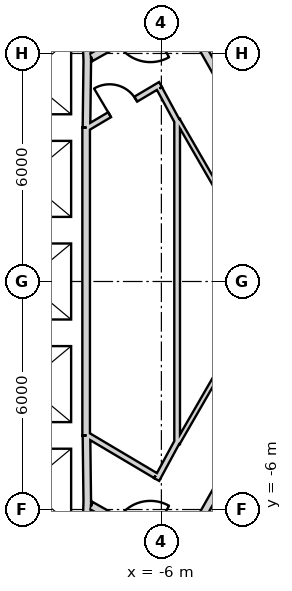
"""IFC4 building model, lengths in metres.
Left out: names, types, materials, properties, quantities, classifications, styles, units other than length and angle.
Written with IfcOpenShell. Run it as: python <this file> out.ifc"""

import sys

from ifc_helpers import new_model, si_unit, direction, frame, frame_2d, origin, place, context, subcontext, project, spatial, rectangle, extrude, element, fill, save


model = new_model("IFC4")
c1 = context("Model", 3, precision=1e-05, world=origin(), true_north=direction((0.0, 1.0)))
c2 = subcontext(c1, "Body", "Model", "MODEL_VIEW")
j1 = project(units=[si_unit("LENGTHUNIT", "METRE"), si_unit("PLANEANGLEUNIT", "RADIAN")], contexts=[c1])
p1 = place(None, origin())
s1 = spatial("IfcSite", under=j1, at=p1, CompositionType="ELEMENT")
p2 = place(p1, origin())
s2 = spatial("IfcBuilding", under=s1, at=p2, CompositionType="ELEMENT")
p3 = place(p2, origin())
s3 = spatial("IfcBuildingStorey", under=s2, at=p3, CompositionType="ELEMENT", Elevation=0.0)
p4 = place(p3, frame((19.475, 2.208, 0.0), z_axis=(0.0, 0.0, 1.0), x_axis=(-0.866028369851, 0.499994862586, 0.0)))
e1 = element("IfcWall", 1, at=p4, inside=s3, PredefinedType="SHEAR", context=c2, shape_type="SweptSolid", body=[
    extrude(rectangle(XDim=31.523, YDim=0.9, at=frame_2d((15.762, 0.0))), origin(), (0.0, 0.0, 1.0), 9.0),
])
p5 = place(p4, frame((7.062, 0.0, 0.0)))
e2 = element("IfcOpeningElement", 2, at=p5, cuts=e1, PredefinedType="OPENING", context=c2, shape_type="SweptSolid", body=[
    extrude(rectangle(XDim=1.2, YDim=2.4, at=frame_2d((0.6, 1.2))), frame((0.0, 0.46, 0.0), z_axis=(0.0, -1.0, 0.0), x_axis=(1.0, 0.0, 0.0)), (0.0, 0.0, 1.0), 0.92),
])
p6 = place(p4, frame((9.762, 0.0, 0.0)))
e3 = element("IfcOpeningElement", 3, at=p6, cuts=e1, PredefinedType="OPENING", context=c2, shape_type="SweptSolid", body=[
    extrude(rectangle(XDim=1.2, YDim=2.4, at=frame_2d((0.6, 1.2))), frame((0.0, 0.46, 0.0), z_axis=(0.0, -1.0, 0.0), x_axis=(1.0, 0.0, 0.0)), (0.0, 0.0, 1.0), 0.92),
])
p7 = place(p4, frame((12.462, 0.0, 0.0)))
e4 = element("IfcOpeningElement", 4, at=p7, cuts=e1, PredefinedType="OPENING", context=c2, shape_type="SweptSolid", body=[
    extrude(rectangle(XDim=1.2, YDim=2.4, at=frame_2d((0.6, 1.2))), frame((0.0, 0.46, 0.0), z_axis=(0.0, -1.0, 0.0), x_axis=(1.0, 0.0, 0.0)), (0.0, 0.0, 1.0), 0.92),
])
p8 = place(p4, frame((15.162, 0.0, 0.0)))
e5 = element("IfcOpeningElement", 5, at=p8, cuts=e1, PredefinedType="OPENING", context=c2, shape_type="SweptSolid", body=[
    extrude(rectangle(XDim=1.2, YDim=2.4, at=frame_2d((0.6, 1.2))), frame((0.0, 0.46, 0.0), z_axis=(0.0, -1.0, 0.0), x_axis=(1.0, 0.0, 0.0)), (0.0, 0.0, 1.0), 0.92),
])
p9 = place(p4, frame((17.862, 0.0, 0.0)))
e6 = element("IfcOpeningElement", 6, at=p9, cuts=e1, PredefinedType="OPENING", context=c2, shape_type="SweptSolid", body=[
    extrude(rectangle(XDim=1.2, YDim=2.4, at=frame_2d((0.6, 1.2))), frame((0.0, 0.46, 0.0), z_axis=(0.0, -1.0, 0.0), x_axis=(1.0, 0.0, 0.0)), (0.0, 0.0, 1.0), 0.92),
])
p10 = place(p4, frame((20.562, 0.0, 0.0)))
e7 = element("IfcOpeningElement", 7, at=p10, cuts=e1, PredefinedType="OPENING", context=c2, shape_type="SweptSolid", body=[
    extrude(rectangle(XDim=1.2, YDim=2.4, at=frame_2d((0.6, 1.2))), frame((0.0, 0.46, 0.0), z_axis=(0.0, -1.0, 0.0), x_axis=(1.0, 0.0, 0.0)), (0.0, 0.0, 1.0), 0.92),
])
p11 = place(p4, frame((23.262, 0.0, 0.0)))
e8 = element("IfcOpeningElement", 8, at=p11, cuts=e1, PredefinedType="OPENING", context=c2, shape_type="SweptSolid", body=[
    extrude(rectangle(XDim=1.2, YDim=2.4, at=frame_2d((0.6, 1.2))), frame((0.0, 0.46, 0.0), z_axis=(0.0, -1.0, 0.0), x_axis=(1.0, 0.0, 0.0)), (0.0, 0.0, 1.0), 0.92),
])
p12 = place(p4, frame((3.612, 0.0, 0.0)))
e9 = element("IfcOpeningElement", 9, at=p12, cuts=e1, PredefinedType="OPENING", context=c2, shape_type="SweptSolid", body=[
    extrude(rectangle(XDim=1.2, YDim=2.4, at=frame_2d((0.6, 1.2))), frame((0.0, 0.46, 0.0), z_axis=(0.0, -1.0, 0.0), x_axis=(1.0, 0.0, 0.0)), (0.0, 0.0, 1.0), 0.92),
])
p13 = place(p4, frame((26.712, 0.0, 0.0)))
e10 = element("IfcOpeningElement", 10, at=p13, cuts=e1, PredefinedType="OPENING", context=c2, shape_type="SweptSolid", body=[
    extrude(rectangle(XDim=1.2, YDim=2.4, at=frame_2d((0.6, 1.2))), frame((0.0, 0.46, 0.0), z_axis=(0.0, -1.0, 0.0), x_axis=(1.0, 0.0, 0.0)), (0.0, 0.0, 1.0), 0.92),
])
p14 = place(p3, frame((-7.825, -17.97, 0.0), z_axis=(0.0, 0.0, 1.0), x_axis=(0.866028369851, 0.499994862586, 0.0)))
e11 = element("IfcWall", 11, at=p14, inside=s3, PredefinedType="SHEAR", context=c2, shape_type="SweptSolid", body=[
    extrude(rectangle(XDim=31.523, YDim=0.9, at=frame_2d((15.762, 0.0))), origin(), (0.0, 0.0, 1.0), 9.0),
])
p15 = place(p14, frame((7.062, 0.0, 0.0)))
e12 = element("IfcOpeningElement", 12, at=p15, cuts=e11, PredefinedType="OPENING", context=c2, shape_type="SweptSolid", body=[
    extrude(rectangle(XDim=1.2, YDim=2.4, at=frame_2d((0.6, 1.2))), frame((0.0, 0.46, 0.0), z_axis=(0.0, -1.0, 0.0), x_axis=(1.0, 0.0, 0.0)), (0.0, 0.0, 1.0), 0.92),
])
p16 = place(p14, frame((9.762, 0.0, 0.0)))
e13 = element("IfcOpeningElement", 13, at=p16, cuts=e11, PredefinedType="OPENING", context=c2, shape_type="SweptSolid", body=[
    extrude(rectangle(XDim=1.2, YDim=2.4, at=frame_2d((0.6, 1.2))), frame((0.0, 0.46, 0.0), z_axis=(0.0, -1.0, 0.0), x_axis=(1.0, 0.0, 0.0)), (0.0, 0.0, 1.0), 0.92),
])
p17 = place(p14, frame((12.462, 0.0, 0.0)))
e14 = element("IfcOpeningElement", 14, at=p17, cuts=e11, PredefinedType="OPENING", context=c2, shape_type="SweptSolid", body=[
    extrude(rectangle(XDim=1.2, YDim=2.4, at=frame_2d((0.6, 1.2))), frame((0.0, 0.46, 0.0), z_axis=(0.0, -1.0, 0.0), x_axis=(1.0, 0.0, 0.0)), (0.0, 0.0, 1.0), 0.92),
])
p18 = place(p14, frame((15.162, 0.0, 0.0)))
e15 = element("IfcOpeningElement", 15, at=p18, cuts=e11, PredefinedType="OPENING", context=c2, shape_type="SweptSolid", body=[
    extrude(rectangle(XDim=1.2, YDim=2.4, at=frame_2d((0.6, 1.2))), frame((0.0, 0.46, 0.0), z_axis=(0.0, -1.0, 0.0), x_axis=(1.0, 0.0, 0.0)), (0.0, 0.0, 1.0), 0.92),
])
p19 = place(p14, frame((17.862, 0.0, 0.0)))
e16 = element("IfcOpeningElement", 16, at=p19, cuts=e11, PredefinedType="OPENING", context=c2, shape_type="SweptSolid", body=[
    extrude(rectangle(XDim=1.2, YDim=2.4, at=frame_2d((0.6, 1.2))), frame((0.0, 0.46, 0.0), z_axis=(0.0, -1.0, 0.0), x_axis=(1.0, 0.0, 0.0)), (0.0, 0.0, 1.0), 0.92),
])
p20 = place(p14, frame((20.562, 0.0, 0.0)))
e17 = element("IfcOpeningElement", 17, at=p20, cuts=e11, PredefinedType="OPENING", context=c2, shape_type="SweptSolid", body=[
    extrude(rectangle(XDim=1.2, YDim=2.4, at=frame_2d((0.6, 1.2))), frame((0.0, 0.46, 0.0), z_axis=(0.0, -1.0, 0.0), x_axis=(1.0, 0.0, 0.0)), (0.0, 0.0, 1.0), 0.92),
])
p21 = place(p14, frame((26.712, 0.0, 0.0)))
e18 = element("IfcOpeningElement", 18, at=p21, cuts=e11, PredefinedType="OPENING", context=c2, shape_type="SweptSolid", body=[
    extrude(rectangle(XDim=1.2, YDim=2.4, at=frame_2d((0.6, 1.2))), frame((0.0, 0.46, 0.0), z_axis=(0.0, -1.0, 0.0), x_axis=(1.0, 0.0, 0.0)), (0.0, 0.0, 1.0), 0.92),
])
p22 = place(p14, frame((3.612, 0.0, 0.0)))
e19 = element("IfcOpeningElement", 19, at=p22, cuts=e11, PredefinedType="OPENING", context=c2, shape_type="SweptSolid", body=[
    extrude(rectangle(XDim=1.2, YDim=2.4, at=frame_2d((0.6, 1.2))), frame((0.0, 0.46, 0.0), z_axis=(0.0, -1.0, 0.0), x_axis=(1.0, 0.0, 0.0)), (0.0, 0.0, 1.0), 0.92),
])
p23 = place(p3, frame((-7.977, 6.65, 0.0), z_axis=(0.0, 0.0, 1.0), x_axis=(0.030861509705, -0.999523670164, 0.0)))
e20 = element("IfcWall", 20, at=p23, inside=s3, PredefinedType="PLUMBINGWALL", context=c2, shape_type="SweptSolid", body=[
    extrude(rectangle(XDim=0.878, YDim=0.2, at=frame_2d((0.439, 0.0))), origin(), (0.0, 0.0, 1.0), 8.7),
])
p24 = place(p3, frame((-7.949, 5.895, 0.0), z_axis=(0.0, 0.0, 1.0), x_axis=(-0.012042535896, -0.999927486035, 0.0)))
e21 = element("IfcWall", 21, at=p24, inside=s3, PredefinedType="PLUMBINGWALL", context=c2, shape_type="SweptSolid", body=[
    extrude(rectangle(XDim=1.845, YDim=0.2, at=frame_2d((0.922, 0.0))), origin(), (0.0, 0.0, 1.0), 8.7),
])
p25 = place(p3, frame((-7.98, 4.05, 0.0), z_axis=(0.0, 0.0, 1.0), x_axis=(0.0, -1.0, 0.0)))
e22 = element("IfcWall", 22, at=p25, inside=s3, PredefinedType="PLUMBINGWALL", context=c2, shape_type="SweptSolid", body=[
    extrude(rectangle(XDim=8.1, YDim=0.2, at=frame_2d((4.05, 0.0))), origin(), (0.0, 0.0, 1.0), 8.7),
])
p26 = place(p3, frame((-7.95, -5.772, 0.0), z_axis=(0.0, 0.0, 1.0), x_axis=(-0.030803413295, -0.999525462272, 0.0)))
e23 = element("IfcWall", 23, at=p26, inside=s3, PredefinedType="PLUMBINGWALL", context=c2, shape_type="SweptSolid", body=[
    extrude(rectangle(XDim=1.078, YDim=0.2, at=frame_2d((0.539, 0.0))), origin(), (0.0, 0.0, 1.0), 8.7),
])
p27 = place(p3, frame((-7.971, -4.05, 0.0), z_axis=(0.0, 0.0, 1.0), x_axis=(0.012042535896, -0.999927486035, 0.0)))
e24 = element("IfcWall", 24, at=p27, inside=s3, PredefinedType="PLUMBINGWALL", context=c2, shape_type="SweptSolid", body=[
    extrude(rectangle(XDim=1.845, YDim=0.2, at=frame_2d((0.922, 0.0))), origin(), (0.0, 0.0, 1.0), 8.7),
])
p28 = place(p3, frame((-5.562, 7.296, 0.0), z_axis=(0.0, 0.0, 1.0), x_axis=(0.49134651263, -0.870964180966, 0.0)))
e25 = element("IfcWall", 25, at=p28, inside=s3, PredefinedType="PLUMBINGWALL", context=c2, shape_type="SweptSolid", body=[
    extrude(rectangle(XDim=3.0, YDim=0.2, at=frame_2d((1.5, 0.0))), origin(), (0.0, 0.0, 1.0), 8.7),
])
p29 = place(p3, frame((-3.99, -4.509, 0.0), z_axis=(0.0, 0.0, 1.0), x_axis=(-0.491358283181, -0.870957540612, 0.0)))
e26 = element("IfcWall", 26, at=p29, inside=s3, PredefinedType="PLUMBINGWALL", context=c2, shape_type="SweptSolid", body=[
    extrude(rectangle(XDim=3.2, YDim=0.2, at=frame_2d((1.6, 0.0))), origin(), (0.0, 0.0, 1.0), 8.7),
])
p30 = place(p3, frame((-5.6, 7.16, 0.0), z_axis=(0.0, 0.0, 1.0), x_axis=(-0.871363259478, -0.490638431059, 0.0)))
e27 = element("IfcWall", 27, at=p30, inside=s3, PredefinedType="PARTITIONING", context=c2, shape_type="SweptSolid", body=[
    extrude(rectangle(XDim=2.581, YDim=0.2, at=frame_2d((1.291, 0.0))), origin(), (0.0, 0.0, 1.0), 8.7),
])
p31 = place(p30, frame((0.791, 0.0, 0.0)))
e28 = element("IfcOpeningElement", 28, at=p31, cuts=e27, PredefinedType="OPENING", context=c2, shape_type="SweptSolid", body=[
    extrude(rectangle(XDim=1.0, YDim=2.1, at=frame_2d((0.5, 1.05))), frame((0.0, 0.11, 0.0), z_axis=(0.0, -1.0, 0.0), x_axis=(1.0, 0.0, 0.0)), (0.0, 0.0, 1.0), 0.22),
])
p32 = place(p3, frame((-7.849, -5.894, 0.0), z_axis=(0.0, 0.0, 1.0), x_axis=(0.871363259478, -0.490638431059, 0.0)))
e29 = element("IfcWall", 29, at=p32, inside=s3, PredefinedType="PARTITIONING", context=c2, shape_type="SweptSolid", body=[
    extrude(rectangle(XDim=2.581, YDim=0.2, at=frame_2d((1.291, 0.0))), origin(), (0.0, 0.0, 1.0), 8.7),
])
p33 = place(p32, frame((0.791, 0.0, 0.0)))
e30 = element("IfcOpeningElement", 30, at=p33, cuts=e29, PredefinedType="OPENING", context=c2, shape_type="SweptSolid", body=[
    extrude(rectangle(XDim=1.0, YDim=2.1, at=frame_2d((0.5, 1.05))), frame((0.0, 0.11, 0.0), z_axis=(0.0, -1.0, 0.0), x_axis=(1.0, 0.0, 0.0)), (0.0, 0.0, 1.0), 0.22),
])
p34 = place(p3, frame((-5.586, -4.275, 0.0), z_axis=(0.0, 0.0, 1.0), x_axis=(0.0, 1.0, 0.0)))
e31 = element("IfcWall", 31, at=p34, inside=s3, PredefinedType="PLUMBINGWALL", context=c2, shape_type="SweptSolid", body=[
    extrude(rectangle(XDim=8.549, YDim=0.15, at=frame_2d((4.275, 0.0))), origin(), (0.0, 0.0, 1.0), 8.7),
])
p35 = place(p3, frame((-6.124, -5.211, 0.0), z_axis=(0.0, 0.0, 1.0), x_axis=(0.476228984866, 0.879321303036, 0.0)))
e32 = element("IfcWall", 32, at=p35, inside=s3, PredefinedType="PLUMBINGWALL", context=c2, shape_type="SweptSolid", body=[
    extrude(rectangle(XDim=1.162, YDim=0.15, at=frame_2d((0.581, 0.0))), origin(), (0.0, 0.0, 1.0), 8.7),
])
p36 = place(p3, frame((-7.95, -4.041, 0.0), z_axis=(0.0, 0.0, 1.0), x_axis=(0.860090281069, -0.510141851263, 0.0)))
e33 = element("IfcWall", 33, at=p36, inside=s3, PredefinedType="PLUMBINGWALL", context=c2, shape_type="SweptSolid", body=[
    extrude(rectangle(XDim=2.089, YDim=0.15, at=frame_2d((1.045, 0.0))), origin(), (0.0, 0.0, 1.0), 8.7),
])
p37 = place(p3, frame((-6.024, 5.183, 0.0), z_axis=(0.0, 0.0, 1.0), x_axis=(-0.860126804455, -0.510080268447, 0.0)))
e34 = element("IfcWall", 34, at=p37, inside=s3, PredefinedType="PLUMBINGWALL", context=c2, shape_type="SweptSolid", body=[
    extrude(rectangle(XDim=2.24, YDim=0.15, at=frame_2d((1.12, 0.0))), origin(), (0.0, 0.0, 1.0), 8.7),
])
p38 = place(p37, frame((0.757, 0.0, 0.0)))
e35 = element("IfcOpeningElement", 35, at=p38, cuts=e34, PredefinedType="OPENING", context=c2, shape_type="SweptSolid", body=[
    extrude(rectangle(XDim=0.8, YDim=2.1, at=frame_2d((0.4, 1.05))), frame((0.0, 0.085, 0.0), z_axis=(0.0, -1.0, 0.0), x_axis=(1.0, 0.0, 0.0)), (0.0, 0.0, 1.0), 0.17),
])
p39 = place(p3, frame((-5.571, 4.19, 0.0), z_axis=(0.0, 0.0, 1.0), x_axis=(-0.476127658675, 0.879376172434, 0.0)))
e36 = element("IfcWall", 36, at=p39, inside=s3, PredefinedType="PLUMBINGWALL", context=c2, shape_type="SweptSolid", body=[
    extrude(rectangle(XDim=1.012, YDim=0.15, at=frame_2d((0.506, 0.0))), origin(), (0.0, 0.0, 1.0), 8.7),
])
p40 = place(p3, frame((-4.558, 2.495, 0.0), z_axis=(0.0, 0.0, 1.0), x_axis=(-0.499990325971, 0.866030989016, 0.0)))
e37 = element("IfcWall", 37, at=p40, inside=s3, PredefinedType="PARTITIONING", context=c2, shape_type="SweptSolid", body=[
    extrude(rectangle(XDim=2.025, YDim=0.12, at=frame_2d((1.012, 0.0))), origin(), (0.0, 0.0, 1.0), 8.7),
])
p41 = place(p3, frame((-4.64, -2.517, 0.0), z_axis=(0.0, 0.0, 1.0), x_axis=(0.865989465428, -0.500062241894, 0.0)))
e38 = element("IfcWall", 38, at=p41, inside=s3, PredefinedType="PARTITIONING", context=c2, shape_type="SweptSolid", body=[
    extrude(rectangle(XDim=1.7, YDim=0.12, at=frame_2d((0.85, 0.0))), origin(), (0.0, 0.0, 1.0), 8.7),
])
p42 = place(p3, frame((-5.571, -4.249, 0.0), z_axis=(0.0, 0.0, 1.0), x_axis=(0.500081145431, 0.865978549379, 0.0)))
e39 = element("IfcWall", 39, at=p42, inside=s3, PredefinedType="PARTITIONING", context=c2, shape_type="SweptSolid", body=[
    extrude(rectangle(XDim=1.905, YDim=0.12, at=frame_2d((0.953, 0.0))), origin(), (0.0, 0.0, 1.0), 8.7),
])
p43 = place(p38, origin())
e40 = element("IfcDoor", 40, at=p43, inside=s3, OperationType="SINGLE_SWING_RIGHT", PredefinedType="USERDEFINED", context=c2, shape_type="SweptSolid", body=[
    extrude(rectangle(XDim=0.8, YDim=2.1, at=frame_2d((0.4, 1.05))), frame((0.0, 0.025, 0.0), z_axis=(0.0, -1.0, 0.0), x_axis=(1.0, 0.0, 0.0)), (0.0, 0.0, 1.0), 0.05),
])
fill(e35, e40)
save(model, sys.argv[1])
